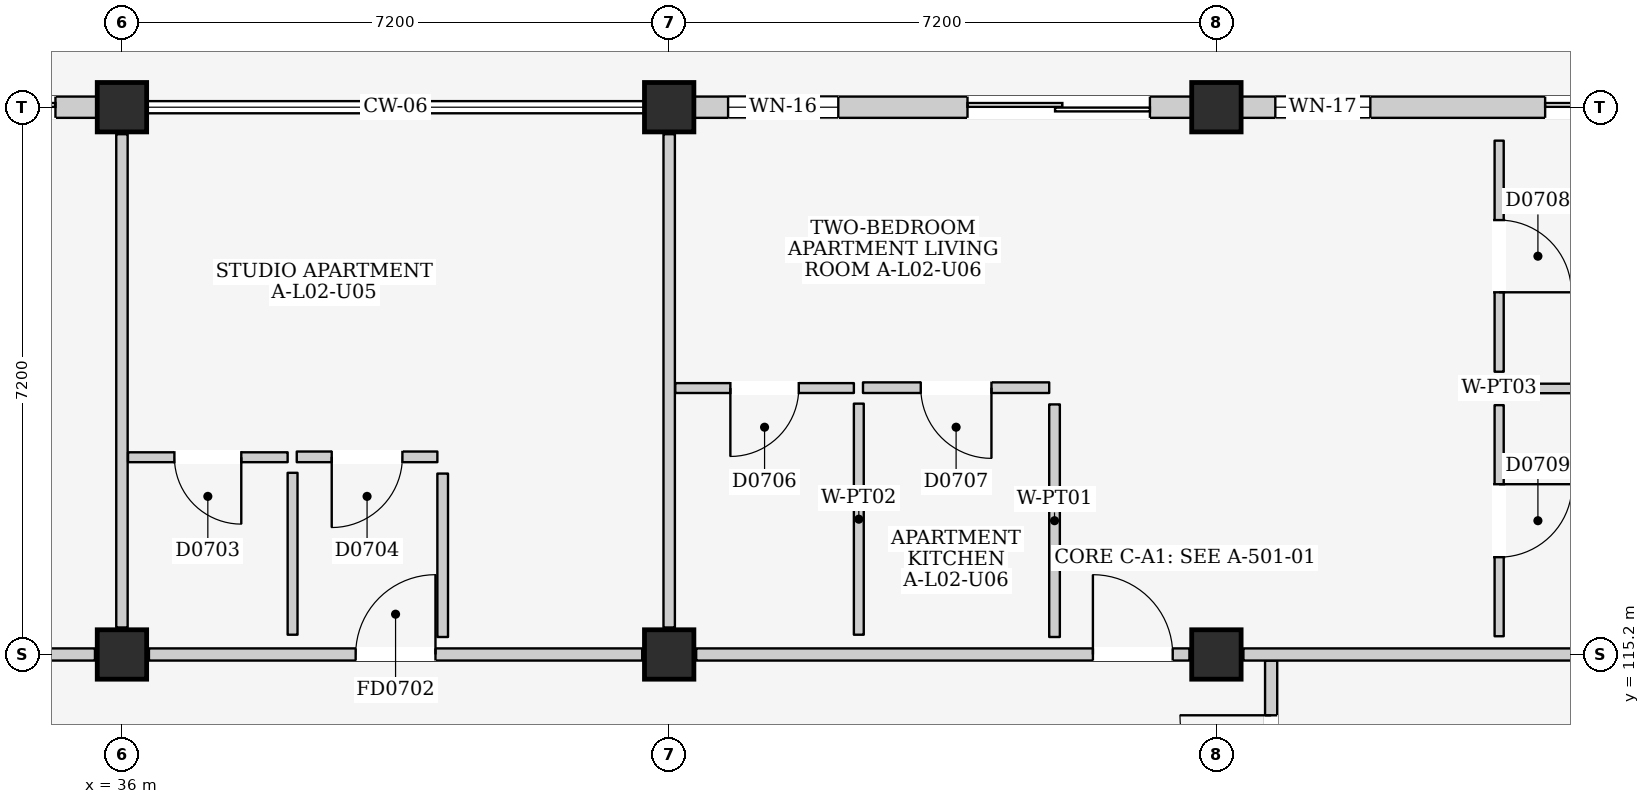
"""IFC4 building model, lengths in metres.
Left out: names, types, materials, properties, quantities, classifications, styles, units other than length and angle.
Written with IfcOpenShell. Run it as: python <this file> out.ifc"""

import sys

from ifc_helpers import new_model, si_unit, direction, frame, frame_2d, origin, origin_2d, place, context, subcontext, project, spatial, rectangle, extrude, element, fill, save


model = new_model("IFC4")
c1 = context("Model", 3, precision=1e-05, world=origin(), true_north=direction((0.0, 1.0)))
c2 = subcontext(c1, "Body", "Model", "MODEL_VIEW")
j1 = project(units=[si_unit("LENGTHUNIT", "METRE"), si_unit("PLANEANGLEUNIT", "RADIAN")], contexts=[c1])
p1 = place(None, origin())
s1 = spatial("IfcSite", under=j1, at=p1, CompositionType="ELEMENT")
p2 = place(p1, origin())
s2 = spatial("IfcBuilding", under=s1, at=p2, CompositionType="ELEMENT")
p3 = place(p2, frame((0.0, 0.0, 9.0)))
s3 = spatial("IfcBuildingStorey", under=s2, at=p3, CompositionType="ELEMENT", Elevation=9.0)
for number, where, z_axis, x_axis in (
    (1, (36.0, 115.2, 0.0), (0.0, 0.0, 1.0), (1.0, 0.0, 0.0)),
    (2, (36.0, 122.4, 0.0), (0.0, 0.0, 1.0), (1.0, 0.0, 0.0)),
    (3, (43.2, 115.2, 0.0), (0.0, 0.0, 1.0), (1.0, 0.0, 0.0)),
    (4, (43.2, 122.4, 0.0), (0.0, 0.0, 1.0), (1.0, 0.0, 0.0)),
    (5, (50.4, 115.2, 0.0), (0.0, 0.0, 1.0), (1.0, 0.0, 0.0)),
    (6, (50.4, 122.4, 0.0), (0.0, 0.0, 1.0), (1.0, 0.0, 0.0)),
):
    element("IfcColumn", number, at=place(p3, frame(where, z_axis=z_axis, x_axis=x_axis)), inside=s3, PredefinedType="COLUMN", context=c2, shape_type="SweptSolid", body=[
        extrude(rectangle(XDim=0.65, YDim=0.65, at=origin_2d()), origin(), (0.0, 0.0, 1.0), 3.2),
    ])
p4 = place(p3, frame((29.125, 122.4, 0.0), z_axis=(0.0, 0.0, 1.0), x_axis=(1.0, 0.0, 0.0)))
e7 = element("IfcWall", 7, at=p4, inside=s3, PredefinedType="ELEMENTEDWALL", context=c2, shape_type="SweptSolid", body=[
    extrude(rectangle(XDim=6.55, YDim=0.28, at=frame_2d((3.275, 0.0))), origin(), (0.0, 0.0, 1.0), 2.425),
])
p5 = place(p4, frame((4.4, 0.0, 0.0)))
e8 = element("IfcOpeningElement", 8, at=p5, cuts=e7, PredefinedType="OPENING", context=c2, shape_type="SweptSolid", body=[
    extrude(rectangle(XDim=1.6, YDim=2.12, at=frame_2d((0.8, 1.06))), frame((0.0, 0.155, 0.0), z_axis=(0.0, -1.0, 0.0), x_axis=(1.0, 0.0, 0.0)), (0.0, 0.0, 1.0), 0.31),
])
p6 = place(p4, frame((0.45, 0.0, 0.815)))
e9 = element("IfcOpeningElement", 9, at=p6, cuts=e7, PredefinedType="OPENING", context=c2, shape_type="SweptSolid", body=[
    extrude(rectangle(XDim=1.35, YDim=1.5, at=frame_2d((0.675, 0.75))), frame((0.0, 0.155, 0.0), z_axis=(0.0, -1.0, 0.0), x_axis=(1.0, 0.0, 0.0)), (0.0, 0.0, 1.0), 0.31),
])
p7 = place(p3, frame((43.525, 122.4, 0.0), z_axis=(0.0, 0.0, 1.0), x_axis=(1.0, 0.0, 0.0)))
e10 = element("IfcWall", 10, at=p7, inside=s3, PredefinedType="ELEMENTEDWALL", context=c2, shape_type="SweptSolid", body=[
    extrude(rectangle(XDim=6.55, YDim=0.28, at=frame_2d((3.275, 0.0))), origin(), (0.0, 0.0, 1.0), 2.425),
])
p8 = place(p7, frame((3.6, 0.0, 0.0)))
e11 = element("IfcOpeningElement", 11, at=p8, cuts=e10, PredefinedType="OPENING", context=c2, shape_type="SweptSolid", body=[
    extrude(rectangle(XDim=2.4, YDim=2.12, at=frame_2d((1.2, 1.06))), frame((0.0, 0.155, 0.0), z_axis=(0.0, -1.0, 0.0), x_axis=(1.0, 0.0, 0.0)), (0.0, 0.0, 1.0), 0.31),
])
p9 = place(p7, frame((0.45, 0.0, 0.9)))
e12 = element("IfcOpeningElement", 12, at=p9, cuts=e10, PredefinedType="OPENING", context=c2, shape_type="SweptSolid", body=[
    extrude(rectangle(XDim=1.45, YDim=1.4, at=frame_2d((0.725, 0.7))), frame((0.0, 0.155, 0.0), z_axis=(0.0, -1.0, 0.0), x_axis=(1.0, 0.0, 0.0)), (0.0, 0.0, 1.0), 0.31),
])
p10 = place(p3, frame((50.725, 122.4, 0.0), z_axis=(0.0, 0.0, 1.0), x_axis=(1.0, 0.0, 0.0)))
e13 = element("IfcWall", 13, at=p10, inside=s3, PredefinedType="ELEMENTEDWALL", context=c2, shape_type="SweptSolid", body=[
    extrude(rectangle(XDim=6.55, YDim=0.28, at=frame_2d((3.275, 0.0))), origin(), (0.0, 0.0, 1.0), 2.425),
])
p11 = place(p10, frame((4.0, 0.0, 0.0)))
e14 = element("IfcOpeningElement", 14, at=p11, cuts=e13, PredefinedType="OPENING", context=c2, shape_type="SweptSolid", body=[
    extrude(rectangle(XDim=2.0, YDim=2.12, at=frame_2d((1.0, 1.06))), frame((0.0, 0.155, 0.0), z_axis=(0.0, -1.0, 0.0), x_axis=(1.0, 0.0, 0.0)), (0.0, 0.0, 1.0), 0.31),
])
p12 = place(p10, frame((0.45, 0.0, 0.9)))
e15 = element("IfcOpeningElement", 15, at=p12, cuts=e13, PredefinedType="OPENING", context=c2, shape_type="SweptSolid", body=[
    extrude(rectangle(XDim=1.25, YDim=1.3, at=frame_2d((0.625, 0.65))), frame((0.0, 0.155, 0.0), z_axis=(0.0, -1.0, 0.0), x_axis=(1.0, 0.0, 0.0)), (0.0, 0.0, 1.0), 0.31),
])
p13 = place(p3, frame((51.12, 111.1, 0.0), z_axis=(0.0, 0.0, 1.0), x_axis=(0.0, 1.0, 0.0)))
e16 = element("IfcWall", 16, at=p13, inside=s3, PredefinedType="PARTITIONING", context=c2, shape_type="SweptSolid", body=[
    extrude(rectangle(XDim=4.02, YDim=0.16, at=frame_2d((2.01, 0.0))), origin(), (0.0, 0.0, 1.0), 2.96),
])
p14 = place(p13, frame((2.1, 0.0, 0.0)))
e17 = element("IfcOpeningElement", 17, at=p14, cuts=e16, PredefinedType="OPENING", context=c2, shape_type="SweptSolid", body=[
    extrude(rectangle(XDim=1.2, YDim=2.2, at=frame_2d((0.6, 1.1))), frame((0.0, 0.095, 0.0), z_axis=(0.0, -1.0, 0.0), x_axis=(1.0, 0.0, 0.0)), (0.0, 0.0, 1.0), 0.19),
])
p15 = place(p3, frame((29.155, 115.2, 0.0), z_axis=(0.0, 0.0, 1.0), x_axis=(1.0, 0.0, 0.0)))
e18 = element("IfcWall", 18, at=p15, inside=s3, PredefinedType="PARTITIONING", context=c2, shape_type="SweptSolid", body=[
    extrude(rectangle(XDim=6.49, YDim=0.16, at=frame_2d((3.245, 0.0))), origin(), (0.0, 0.0, 1.0), 2.295),
])
p16 = place(p15, frame((2.72, 0.0, 0.0)))
e19 = element("IfcOpeningElement", 19, at=p16, cuts=e18, PredefinedType="OPENING", context=c2, shape_type="SweptSolid", body=[
    extrude(rectangle(XDim=1.05, YDim=2.15, at=frame_2d((0.525, 1.075))), frame((0.0, 0.095, 0.0), z_axis=(0.0, -1.0, 0.0), x_axis=(1.0, 0.0, 0.0)), (0.0, 0.0, 1.0), 0.19),
])
p17 = place(p3, frame((36.0, 115.555, 0.0), z_axis=(0.0, 0.0, 1.0), x_axis=(0.0, 1.0, 0.0)))
e20 = element("IfcWall", 20, at=p17, inside=s3, PredefinedType="PARTITIONING", context=c2, shape_type="SweptSolid", body=[
    extrude(rectangle(XDim=6.49, YDim=0.15, at=frame_2d((3.245, 0.0))), origin(), (0.0, 0.0, 1.0), 2.395),
])
p18 = place(p3, frame((36.355, 115.2, 0.0), z_axis=(0.0, 0.0, 1.0), x_axis=(1.0, 0.0, 0.0)))
e21 = element("IfcWall", 21, at=p18, inside=s3, PredefinedType="PARTITIONING", context=c2, shape_type="SweptSolid", body=[
    extrude(rectangle(XDim=6.49, YDim=0.16, at=frame_2d((3.245, 0.0))), origin(), (0.0, 0.0, 1.0), 2.295),
])
p19 = place(p18, frame((2.72, 0.0, 0.0)))
e22 = element("IfcOpeningElement", 22, at=p19, cuts=e21, PredefinedType="OPENING", context=c2, shape_type="SweptSolid", body=[
    extrude(rectangle(XDim=1.05, YDim=2.15, at=frame_2d((0.525, 1.075))), frame((0.0, 0.095, 0.0), z_axis=(0.0, -1.0, 0.0), x_axis=(1.0, 0.0, 0.0)), (0.0, 0.0, 1.0), 0.19),
])
p20 = place(p3, frame((43.2, 115.555, 0.0), z_axis=(0.0, 0.0, 1.0), x_axis=(0.0, 1.0, 0.0)))
e23 = element("IfcWall", 23, at=p20, inside=s3, PredefinedType="PARTITIONING", context=c2, shape_type="SweptSolid", body=[
    extrude(rectangle(XDim=6.49, YDim=0.15, at=frame_2d((3.245, 0.0))), origin(), (0.0, 0.0, 1.0), 2.395),
])
p21 = place(p3, frame((36.08, 117.795, 0.0), z_axis=(0.0, 0.0, 1.0), x_axis=(1.0, 0.0, 0.0)))
e24 = element("IfcWall", 24, at=p21, inside=s3, PredefinedType="PARTITIONING", context=c2, shape_type="SweptSolid", body=[
    extrude(rectangle(XDim=2.1, YDim=0.13, at=frame_2d((1.05, 0.0))), origin(), (0.0, 0.0, 1.0), 2.96),
])
p22 = place(p21, frame((0.61, 0.0, 0.0)))
e25 = element("IfcOpeningElement", 25, at=p22, cuts=e24, PredefinedType="OPENING", context=c2, shape_type="SweptSolid", body=[
    extrude(rectangle(XDim=0.88, YDim=2.1, at=frame_2d((0.44, 1.05))), frame((0.0, 0.08, 0.0), z_axis=(0.0, -1.0, 0.0), x_axis=(1.0, 0.0, 0.0)), (0.0, 0.0, 1.0), 0.16),
])
p23 = place(p3, frame((38.245, 115.46, 0.0), z_axis=(0.0, 0.0, 1.0), x_axis=(0.0, 1.0, 0.0)))
e26 = element("IfcWall", 26, at=p23, inside=s3, PredefinedType="PARTITIONING", context=c2, shape_type="SweptSolid", body=[
    extrude(rectangle(XDim=2.13, YDim=0.13, at=frame_2d((1.065, 0.0))), origin(), (0.0, 0.0, 1.0), 2.96),
])
p24 = place(p3, frame((38.3, 117.8, 0.0), z_axis=(0.0, 0.0, 1.0), x_axis=(1.0, 0.0, 0.0)))
e27 = element("IfcWall", 27, at=p24, inside=s3, PredefinedType="PARTITIONING", context=c2, shape_type="SweptSolid", body=[
    extrude(rectangle(XDim=1.85, YDim=0.14, at=frame_2d((0.925, 0.0))), origin(), (0.0, 0.0, 1.0), 2.96),
])
p25 = place(p24, frame((0.46, 0.0, 0.0)))
e28 = element("IfcOpeningElement", 28, at=p25, cuts=e27, PredefinedType="OPENING", context=c2, shape_type="SweptSolid", body=[
    extrude(rectangle(XDim=0.93, YDim=2.14, at=frame_2d((0.465, 1.07))), frame((0.0, 0.085, 0.0), z_axis=(0.0, -1.0, 0.0), x_axis=(1.0, 0.0, 0.0)), (0.0, 0.0, 1.0), 0.17),
])
p26 = place(p3, frame((40.22, 115.43, 0.0), z_axis=(0.0, 0.0, 1.0), x_axis=(0.0, 1.0, 0.0)))
e29 = element("IfcWall", 29, at=p26, inside=s3, PredefinedType="PARTITIONING", context=c2, shape_type="SweptSolid", body=[
    extrude(rectangle(XDim=2.15, YDim=0.14, at=frame_2d((1.075, 0.0))), origin(), (0.0, 0.0, 1.0), 2.96),
])
p27 = place(p3, frame((43.555, 115.2, 0.0), z_axis=(0.0, 0.0, 1.0), x_axis=(1.0, 0.0, 0.0)))
e30 = element("IfcWall", 30, at=p27, inside=s3, PredefinedType="PARTITIONING", context=c2, shape_type="SweptSolid", body=[
    extrude(rectangle(XDim=6.49, YDim=0.16, at=frame_2d((3.245, 0.0))), origin(), (0.0, 0.0, 1.0), 2.295),
])
p28 = place(p27, frame((5.22, 0.0, 0.0)))
e31 = element("IfcOpeningElement", 31, at=p28, cuts=e30, PredefinedType="OPENING", context=c2, shape_type="SweptSolid", body=[
    extrude(rectangle(XDim=1.05, YDim=2.15, at=frame_2d((0.525, 1.075))), frame((0.0, 0.095, 0.0), z_axis=(0.0, -1.0, 0.0), x_axis=(1.0, 0.0, 0.0)), (0.0, 0.0, 1.0), 0.19),
])
p29 = place(p3, frame((50.755, 115.2, 0.0), z_axis=(0.0, 0.0, 1.0), x_axis=(1.0, 0.0, 0.0)))
e32 = element("IfcWall", 32, at=p29, inside=s3, PredefinedType="PARTITIONING", context=c2, shape_type="SweptSolid", body=[
    extrude(rectangle(XDim=6.49, YDim=0.16, at=frame_2d((3.245, 0.0))), origin(), (0.0, 0.0, 1.0), 2.295),
])
p30 = place(p3, frame((43.28, 118.705, 0.0), z_axis=(0.0, 0.0, 1.0), x_axis=(1.0, 0.0, 0.0)))
e33 = element("IfcWall", 33, at=p30, inside=s3, PredefinedType="PARTITIONING", context=c2, shape_type="SweptSolid", body=[
    extrude(rectangle(XDim=2.35, YDim=0.13, at=frame_2d((1.175, 0.0))), origin(), (0.0, 0.0, 1.0), 2.96),
])
p31 = place(p30, frame((0.725, 0.0, 0.0)))
e34 = element("IfcOpeningElement", 34, at=p31, cuts=e33, PredefinedType="OPENING", context=c2, shape_type="SweptSolid", body=[
    extrude(rectangle(XDim=0.9, YDim=2.1, at=frame_2d((0.45, 1.05))), frame((0.0, 0.08, 0.0), z_axis=(0.0, -1.0, 0.0), x_axis=(1.0, 0.0, 0.0)), (0.0, 0.0, 1.0), 0.16),
])
p32 = place(p3, frame((45.695, 115.46, 0.0), z_axis=(0.0, 0.0, 1.0), x_axis=(0.0, 1.0, 0.0)))
e35 = element("IfcWall", 35, at=p32, inside=s3, PredefinedType="PARTITIONING", context=c2, shape_type="SweptSolid", body=[
    extrude(rectangle(XDim=3.04, YDim=0.13, at=frame_2d((1.52, 0.0))), origin(), (0.0, 0.0, 1.0), 2.96),
])
p33 = place(p3, frame((45.75, 118.71, 0.0), z_axis=(0.0, 0.0, 1.0), x_axis=(1.0, 0.0, 0.0)))
e36 = element("IfcWall", 36, at=p33, inside=s3, PredefinedType="PARTITIONING", context=c2, shape_type="SweptSolid", body=[
    extrude(rectangle(XDim=2.45, YDim=0.14, at=frame_2d((1.225, 0.0))), origin(), (0.0, 0.0, 1.0), 2.96),
])
p34 = place(p33, frame((0.76, 0.0, 0.0)))
e37 = element("IfcOpeningElement", 37, at=p34, cuts=e36, PredefinedType="OPENING", context=c2, shape_type="SweptSolid", body=[
    extrude(rectangle(XDim=0.93, YDim=2.14, at=frame_2d((0.465, 1.07))), frame((0.0, 0.085, 0.0), z_axis=(0.0, -1.0, 0.0), x_axis=(1.0, 0.0, 0.0)), (0.0, 0.0, 1.0), 0.17),
])
p35 = place(p3, frame((48.27, 115.43, 0.0), z_axis=(0.0, 0.0, 1.0), x_axis=(0.0, 1.0, 0.0)))
e38 = element("IfcWall", 38, at=p35, inside=s3, PredefinedType="PARTITIONING", context=c2, shape_type="SweptSolid", body=[
    extrude(rectangle(XDim=3.06, YDim=0.14, at=frame_2d((1.53, 0.0))), origin(), (0.0, 0.0, 1.0), 2.96),
])
p36 = place(p3, frame((54.12, 118.92, 0.0), z_axis=(0.0, 0.0, 1.0), x_axis=(0.0, 1.0, 0.0)))
e39 = element("IfcWall", 39, at=p36, inside=s3, PredefinedType="PARTITIONING", context=c2, shape_type="SweptSolid", body=[
    extrude(rectangle(XDim=3.04, YDim=0.12, at=frame_2d((1.52, 0.0))), origin(), (0.0, 0.0, 1.0), 2.96),
])
p37 = place(p36, frame((1.045, 0.0, 0.0)))
e40 = element("IfcOpeningElement", 40, at=p37, cuts=e39, PredefinedType="OPENING", context=c2, shape_type="SweptSolid", body=[
    extrude(rectangle(XDim=0.95, YDim=2.15, at=frame_2d((0.475, 1.075))), frame((0.0, 0.075, 0.0), z_axis=(0.0, -1.0, 0.0), x_axis=(1.0, 0.0, 0.0)), (0.0, 0.0, 1.0), 0.15),
])
p38 = place(p3, frame((54.32, 118.7, 0.0), z_axis=(0.0, 0.0, 1.0), x_axis=(1.0, 0.0, 0.0)))
e41 = element("IfcWall", 41, at=p38, inside=s3, PredefinedType="PARTITIONING", context=c2, shape_type="SweptSolid", body=[
    extrude(rectangle(XDim=3.06, YDim=0.125, at=frame_2d((1.53, 0.0))), origin(), (0.0, 0.0, 1.0), 2.96),
])
p39 = place(p3, frame((54.12, 115.44, 0.0), z_axis=(0.0, 0.0, 1.0), x_axis=(0.0, 1.0, 0.0)))
e42 = element("IfcWall", 42, at=p39, inside=s3, PredefinedType="PARTITIONING", context=c2, shape_type="SweptSolid", body=[
    extrude(rectangle(XDim=3.04, YDim=0.12, at=frame_2d((1.52, 0.0))), origin(), (0.0, 0.0, 1.0), 2.96),
])
p40 = place(p39, frame((1.04, 0.0, 0.0)))
e43 = element("IfcOpeningElement", 43, at=p40, cuts=e42, PredefinedType="OPENING", context=c2, shape_type="SweptSolid", body=[
    extrude(rectangle(XDim=0.96, YDim=2.15, at=frame_2d((0.48, 1.075))), frame((0.0, 0.075, 0.0), z_axis=(0.0, -1.0, 0.0), x_axis=(1.0, 0.0, 0.0)), (0.0, 0.0, 1.0), 0.15),
])
p41 = place(p5, frame((1.6, 0.0, 0.0), z_axis=(0.0, 0.0, 1.0), x_axis=(-1.0, 0.0, 0.0)))
e44 = element("IfcDoor", 44, at=p41, inside=s3, OperationType="SLIDING_TO_RIGHT", PredefinedType="DOOR", context=c2, shape_type="SweptSolid", body=[
    extrude(rectangle(XDim=1.6, YDim=2.12, at=frame_2d((0.8, 1.06))), frame((0.0, 0.025, 0.0), z_axis=(0.0, -1.0, 0.0), x_axis=(1.0, 0.0, 0.0)), (0.0, 0.0, 1.0), 0.05),
])
fill(e8, e44)
p42 = place(p8, frame((2.4, 0.0, 0.0), z_axis=(0.0, 0.0, 1.0), x_axis=(-1.0, 0.0, 0.0)))
e45 = element("IfcDoor", 45, at=p42, inside=s3, OperationType="DOUBLE_DOOR_SLIDING", PredefinedType="DOOR", context=c2, shape_type="SweptSolid", body=[
    extrude(rectangle(XDim=2.4, YDim=2.12, at=frame_2d((1.2, 1.06))), frame((0.0, 0.025, 0.0), z_axis=(0.0, -1.0, 0.0), x_axis=(1.0, 0.0, 0.0)), (0.0, 0.0, 1.0), 0.05),
])
fill(e11, e45)
p43 = place(p9, origin())
e46 = element("IfcWindow", 46, at=p43, inside=s3, PartitioningType="DOUBLE_PANEL_VERTICAL", PredefinedType="WINDOW", context=c2, shape_type="SweptSolid", body=[
    extrude(rectangle(XDim=1.45, YDim=1.4, at=frame_2d((0.725, 0.7))), frame((0.0, 0.03, 0.0), z_axis=(0.0, -1.0, 0.0), x_axis=(1.0, 0.0, 0.0)), (0.0, 0.0, 1.0), 0.06),
])
fill(e12, e46)
p44 = place(p11, frame((2.0, 0.0, 0.0), z_axis=(0.0, 0.0, 1.0), x_axis=(-1.0, 0.0, 0.0)))
e47 = element("IfcDoor", 47, at=p44, inside=s3, OperationType="DOUBLE_DOOR_SLIDING", PredefinedType="DOOR", context=c2, shape_type="SweptSolid", body=[
    extrude(rectangle(XDim=2.0, YDim=2.12, at=frame_2d((1.0, 1.06))), frame((0.0, 0.025, 0.0), z_axis=(0.0, -1.0, 0.0), x_axis=(1.0, 0.0, 0.0)), (0.0, 0.0, 1.0), 0.05),
])
fill(e14, e47)
p45 = place(p12, origin())
e48 = element("IfcWindow", 48, at=p45, inside=s3, PartitioningType="SINGLE_PANEL", PredefinedType="WINDOW", context=c2, shape_type="SweptSolid", body=[
    extrude(rectangle(XDim=1.25, YDim=1.3, at=frame_2d((0.625, 0.65))), frame((0.0, 0.03, 0.0), z_axis=(0.0, -1.0, 0.0), x_axis=(1.0, 0.0, 0.0)), (0.0, 0.0, 1.0), 0.06),
])
fill(e15, e48)
p46 = place(p14, origin())
e49 = element("IfcDoor", 49, at=p46, inside=s3, OperationType="SINGLE_SWING_RIGHT", PredefinedType="DOOR", context=c2, shape_type="SweptSolid", body=[
    extrude(rectangle(XDim=1.2, YDim=2.2, at=frame_2d((0.6, 1.1))), frame((0.0, 0.025, 0.0), z_axis=(0.0, -1.0, 0.0), x_axis=(1.0, 0.0, 0.0)), (0.0, 0.0, 1.0), 0.05),
])
fill(e17, e49)
p47 = place(p19, origin())
e50 = element("IfcDoor", 50, at=p47, inside=s3, OperationType="SINGLE_SWING_RIGHT", PredefinedType="DOOR", context=c2, shape_type="SweptSolid", body=[
    extrude(rectangle(XDim=1.05, YDim=2.15, at=frame_2d((0.525, 1.075))), frame((0.0, 0.025, 0.0), z_axis=(0.0, -1.0, 0.0), x_axis=(1.0, 0.0, 0.0)), (0.0, 0.0, 1.0), 0.05),
])
fill(e22, e50)
p48 = place(p22, frame((0.88, 0.0, 0.0), z_axis=(0.0, 0.0, 1.0), x_axis=(-1.0, 0.0, 0.0)))
e51 = element("IfcDoor", 51, at=p48, inside=s3, OperationType="SINGLE_SWING_LEFT", PredefinedType="DOOR", context=c2, shape_type="SweptSolid", body=[
    extrude(rectangle(XDim=0.88, YDim=2.1, at=frame_2d((0.44, 1.05))), frame((0.0, 0.025, 0.0), z_axis=(0.0, -1.0, 0.0), x_axis=(1.0, 0.0, 0.0)), (0.0, 0.0, 1.0), 0.05),
])
fill(e25, e51)
p49 = place(p25, frame((0.93, 0.0, 0.0), z_axis=(0.0, 0.0, 1.0), x_axis=(-1.0, 0.0, 0.0)))
e52 = element("IfcDoor", 52, at=p49, inside=s3, OperationType="SINGLE_SWING_RIGHT", PredefinedType="DOOR", context=c2, shape_type="SweptSolid", body=[
    extrude(rectangle(XDim=0.93, YDim=2.14, at=frame_2d((0.465, 1.07))), frame((0.0, 0.025, 0.0), z_axis=(0.0, -1.0, 0.0), x_axis=(1.0, 0.0, 0.0)), (0.0, 0.0, 1.0), 0.05),
])
fill(e28, e52)
p50 = place(p28, origin())
e53 = element("IfcDoor", 53, at=p50, inside=s3, OperationType="SINGLE_SWING_LEFT", PredefinedType="DOOR", context=c2, shape_type="SweptSolid", body=[
    extrude(rectangle(XDim=1.05, YDim=2.15, at=frame_2d((0.525, 1.075))), frame((0.0, 0.025, 0.0), z_axis=(0.0, -1.0, 0.0), x_axis=(1.0, 0.0, 0.0)), (0.0, 0.0, 1.0), 0.05),
])
fill(e31, e53)
p51 = place(p31, frame((0.9, 0.0, 0.0), z_axis=(0.0, 0.0, 1.0), x_axis=(-1.0, 0.0, 0.0)))
e54 = element("IfcDoor", 54, at=p51, inside=s3, OperationType="SINGLE_SWING_RIGHT", PredefinedType="DOOR", context=c2, shape_type="SweptSolid", body=[
    extrude(rectangle(XDim=0.9, YDim=2.1, at=frame_2d((0.45, 1.05))), frame((0.0, 0.025, 0.0), z_axis=(0.0, -1.0, 0.0), x_axis=(1.0, 0.0, 0.0)), (0.0, 0.0, 1.0), 0.05),
])
fill(e34, e54)
p52 = place(p34, frame((0.93, 0.0, 0.0), z_axis=(0.0, 0.0, 1.0), x_axis=(-1.0, 0.0, 0.0)))
e55 = element("IfcDoor", 55, at=p52, inside=s3, OperationType="SINGLE_SWING_LEFT", PredefinedType="DOOR", context=c2, shape_type="SweptSolid", body=[
    extrude(rectangle(XDim=0.93, YDim=2.14, at=frame_2d((0.465, 1.07))), frame((0.0, 0.025, 0.0), z_axis=(0.0, -1.0, 0.0), x_axis=(1.0, 0.0, 0.0)), (0.0, 0.0, 1.0), 0.05),
])
fill(e37, e55)
p53 = place(p37, frame((0.95, 0.0, 0.0), z_axis=(0.0, 0.0, 1.0), x_axis=(-1.0, 0.0, 0.0)))
e56 = element("IfcDoor", 56, at=p53, inside=s3, OperationType="SINGLE_SWING_RIGHT", PredefinedType="DOOR", context=c2, shape_type="SweptSolid", body=[
    extrude(rectangle(XDim=0.95, YDim=2.15, at=frame_2d((0.475, 1.075))), frame((0.0, 0.025, 0.0), z_axis=(0.0, -1.0, 0.0), x_axis=(1.0, 0.0, 0.0)), (0.0, 0.0, 1.0), 0.05),
])
fill(e40, e56)
p54 = place(p40, frame((0.96, 0.0, 0.0), z_axis=(0.0, 0.0, 1.0), x_axis=(-1.0, 0.0, 0.0)))
e57 = element("IfcDoor", 57, at=p54, inside=s3, OperationType="SINGLE_SWING_LEFT", PredefinedType="DOOR", context=c2, shape_type="SweptSolid", body=[
    extrude(rectangle(XDim=0.96, YDim=2.15, at=frame_2d((0.48, 1.075))), frame((0.0, 0.025, 0.0), z_axis=(0.0, -1.0, 0.0), x_axis=(1.0, 0.0, 0.0)), (0.0, 0.0, 1.0), 0.05),
])
fill(e43, e57)
save(model, sys.argv[1])
